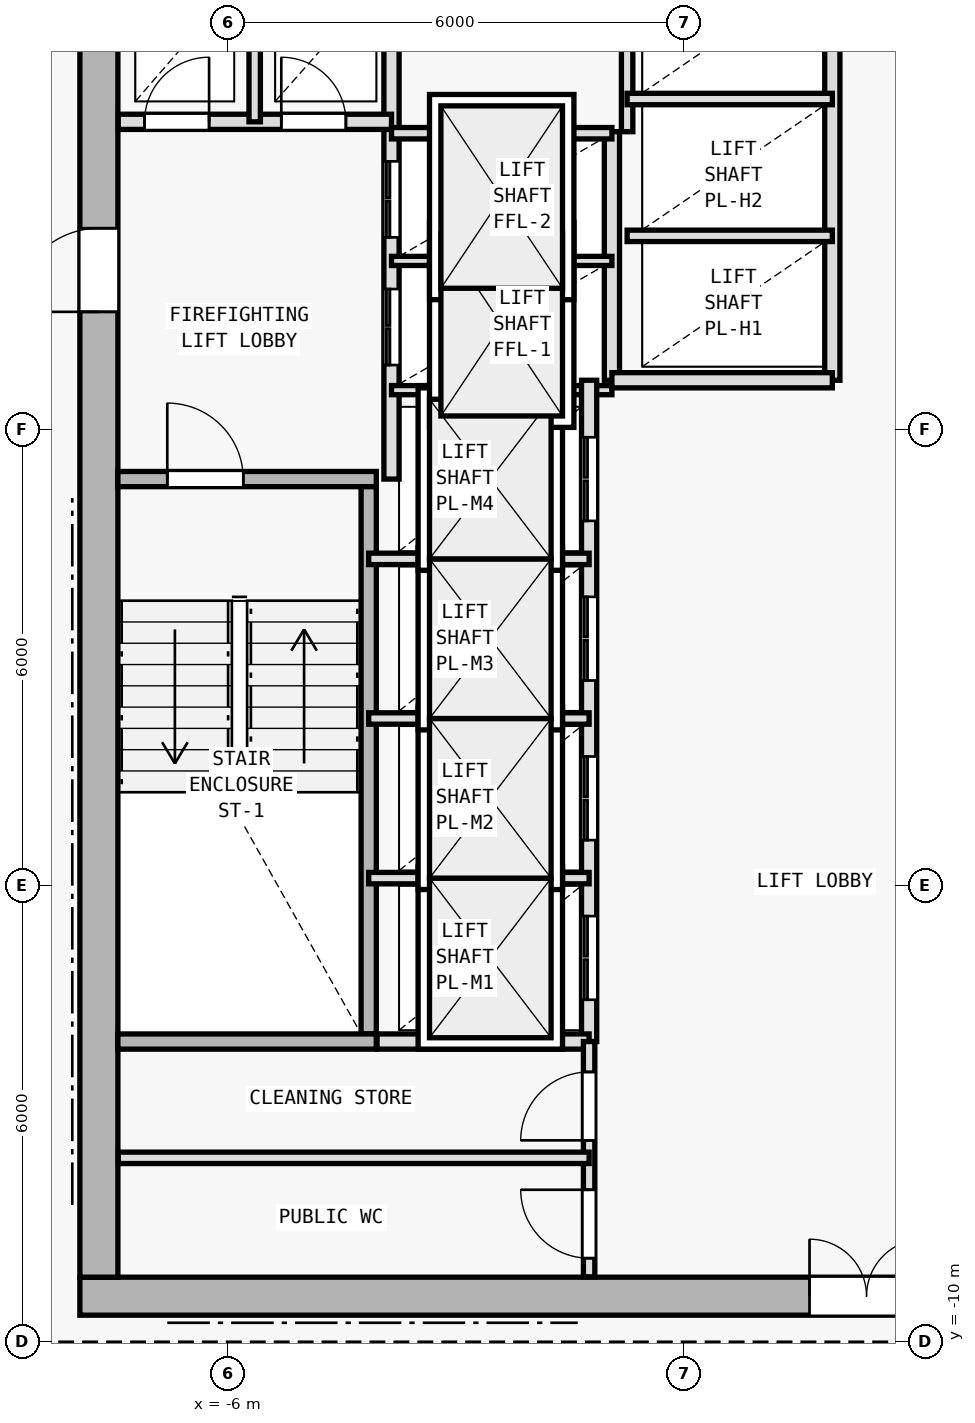
"""IFC4 building model, lengths in metres.
Left out: names, types, materials, properties, quantities, classifications, styles, units other than length and angle.
Written with IfcOpenShell. Run it as: python <this file> out.ifc"""

import sys

from ifc_helpers import new_model, si_unit, direction, frame, frame_2d, origin, origin_2d, place, context, subcontext, project, spatial, rectangle, i_section, extrude, element, fill, save


model = new_model("IFC4")
c1 = context("Model", 3, precision=1e-05, world=origin(), true_north=direction((0.0, 1.0)))
c2 = subcontext(c1, "Body", "Model", "MODEL_VIEW")
j1 = project(units=[si_unit("LENGTHUNIT", "METRE"), si_unit("PLANEANGLEUNIT", "RADIAN")], contexts=[c1])
p1 = place(None, origin())
s1 = spatial("IfcSite", under=j1, at=p1, CompositionType="ELEMENT")
p2 = place(p1, origin())
s2 = spatial("IfcBuilding", under=s1, at=p2, CompositionType="ELEMENT")
p3 = place(p2, frame((0.0, 0.0, 163.8)))
s3 = spatial("IfcBuildingStorey", under=s2, at=p3, CompositionType="ELEMENT", Elevation=163.8)
for number, where, z_axis, x_axis in (
    (1, (-7.7, -9.4, 0.0), (0.0, 0.0, 1.0), (1.0, 0.0, 0.0)),
    (2, (0.0, -9.4, 0.0), (0.0, 0.0, 1.0), (1.0, 0.0, 0.0)),
    (3, (-7.7, 2.0, 0.0), (0.0, 0.0, 1.0), (1.0, 0.0, 0.0)),
):
    element("IfcColumn", number, at=place(p3, frame(where, z_axis=z_axis, x_axis=x_axis)), inside=s3, PredefinedType="COLUMN", context=c2, shape_type="SweptSolid", body=[
        extrude(i_section(OverallWidth=0.404, OverallDepth=0.407, WebThickness=0.017, FlangeThickness=0.028, FilletRadius=0.015, at=origin_2d()), origin(), (0.0, 0.0, 1.0), 3.6),
    ])
p4 = place(p3, frame((-7.95, -9.4, 0.0), z_axis=(0.0, 0.0, 1.0), x_axis=(1.0, 0.0, 0.0)))
e4 = element("IfcWall", 4, at=p4, inside=s3, PredefinedType="SHEAR", context=c2, shape_type="SweptSolid", body=[
    extrude(rectangle(XDim=15.9, YDim=0.5, at=frame_2d((7.95, 0.0))), origin(), (0.0, 0.0, 1.0), 3.35),
])
p5 = place(p4, frame((9.6, 0.0, 0.0)))
e5 = element("IfcOpeningElement", 5, at=p5, cuts=e4, PredefinedType="OPENING", context=c2, shape_type="SweptSolid", body=[
    extrude(rectangle(XDim=1.5, YDim=2.2, at=frame_2d((0.75, 1.1))), frame((0.0, 0.26, 0.0), z_axis=(0.0, -1.0, 0.0), x_axis=(1.0, 0.0, 0.0)), (0.0, 0.0, 1.0), 0.52),
])
p6 = place(p3, frame((-7.7, -9.15, 0.0), z_axis=(0.0, 0.0, 1.0), x_axis=(0.0, 1.0, 0.0)))
e6 = element("IfcWall", 6, at=p6, inside=s3, PredefinedType="SHEAR", context=c2, shape_type="SweptSolid", body=[
    extrude(rectangle(XDim=19.1, YDim=0.5, at=frame_2d((9.55, 0.0))), origin(), (0.0, 0.0, 1.0), 3.35),
])
p7 = place(p6, frame((12.7, 0.0, 0.0)))
e7 = element("IfcOpeningElement", 7, at=p7, cuts=e6, PredefinedType="OPENING", context=c2, shape_type="SweptSolid", body=[
    extrude(rectangle(XDim=1.1, YDim=2.15, at=frame_2d((0.55, 1.075))), frame((0.0, 0.26, 0.0), z_axis=(0.0, -1.0, 0.0), x_axis=(1.0, 0.0, 0.0)), (0.0, 0.0, 1.0), 0.52),
])
p8 = place(p3, frame((-7.45, 1.35, 0.0), z_axis=(0.0, 0.0, 1.0), x_axis=(1.0, 0.0, 0.0)))
e8 = element("IfcWall", 8, at=p8, inside=s3, PredefinedType="SOLIDWALL", context=c2, shape_type="SweptSolid", body=[
    extrude(rectangle(XDim=3.4, YDim=0.2, at=frame_2d((1.7, 0.0))), origin(), (0.0, 0.0, 1.0), 3.35),
])
p9 = place(p8, frame((0.65, 0.0, 0.0)))
e9 = element("IfcOpeningElement", 9, at=p9, cuts=e8, PredefinedType="OPENING", context=c2, shape_type="SweptSolid", body=[
    extrude(rectangle(XDim=1.0, YDim=2.15, at=frame_2d((0.5, 1.075))), frame((0.0, 0.11, 0.0), z_axis=(0.0, -1.0, 0.0), x_axis=(1.0, 0.0, 0.0)), (0.0, 0.0, 1.0), 0.22),
])
p10 = place(p3, frame((-4.15, -5.95, 0.0), z_axis=(0.0, 0.0, 1.0), x_axis=(0.0, 1.0, 0.0)))
e10 = element("IfcWall", 10, at=p10, inside=s3, PredefinedType="SOLIDWALL", context=c2, shape_type="SweptSolid", body=[
    extrude(rectangle(XDim=7.2, YDim=0.2, at=frame_2d((3.6, 0.0))), origin(), (0.0, 0.0, 1.0), 3.35),
])
p11 = place(p3, frame((-3.85, 1.35, 0.0), z_axis=(0.0, 0.0, 1.0), x_axis=(0.0, 1.0, 0.0)))
e11 = element("IfcWall", 11, at=p11, inside=s3, PredefinedType="SOLIDWALL", context=c2, shape_type="SweptSolid", body=[
    extrude(rectangle(XDim=8.595, YDim=0.2, at=frame_2d((4.297, 0.0))), origin(), (0.0, 0.0, 1.0), 3.35),
])
p12 = place(p11, frame((1.5, 0.0, 0.0)))
e12 = element("IfcOpeningElement", 12, at=p12, cuts=e11, PredefinedType="OPENING", context=c2, shape_type="SweptSolid", body=[
    extrude(rectangle(XDim=1.0, YDim=2.15, at=frame_2d((0.5, 1.075))), frame((0.0, 0.11, 0.0), z_axis=(0.0, -1.0, 0.0), x_axis=(1.0, 0.0, 0.0)), (0.0, 0.0, 1.0), 0.22),
])
p13 = place(p11, frame((3.18, 0.0, 0.0)))
e13 = element("IfcOpeningElement", 13, at=p13, cuts=e11, PredefinedType="OPENING", context=c2, shape_type="SweptSolid", body=[
    extrude(rectangle(XDim=1.0, YDim=2.15, at=frame_2d((0.5, 1.075))), frame((0.0, 0.11, 0.0), z_axis=(0.0, -1.0, 0.0), x_axis=(1.0, 0.0, 0.0)), (0.0, 0.0, 1.0), 0.22),
])
p14 = place(p3, frame((-7.445, 6.05, 0.0), z_axis=(0.0, 0.0, 1.0), x_axis=(1.0, 0.0, 0.0)))
e14 = element("IfcWall", 14, at=p14, inside=s3, PredefinedType="SOLIDWALL", context=c2, shape_type="SweptSolid", body=[
    extrude(rectangle(XDim=3.595, YDim=0.2, at=frame_2d((1.797, 0.0))), origin(), (0.0, 0.0, 1.0), 3.35),
])
p15 = place(p14, frame((0.345, 0.0, 0.0)))
e15 = element("IfcOpeningElement", 15, at=p15, cuts=e14, PredefinedType="OPENING", context=c2, shape_type="SweptSolid", body=[
    extrude(rectangle(XDim=0.85, YDim=2.1, at=frame_2d((0.425, 1.05))), frame((0.0, 0.11, 0.0), z_axis=(0.0, -1.0, 0.0), x_axis=(1.0, 0.0, 0.0)), (0.0, 0.0, 1.0), 0.22),
])
p16 = place(p14, frame((2.145, 0.0, 0.0)))
e16 = element("IfcOpeningElement", 16, at=p16, cuts=e14, PredefinedType="OPENING", context=c2, shape_type="SweptSolid", body=[
    extrude(rectangle(XDim=0.85, YDim=2.1, at=frame_2d((0.425, 1.05))), frame((0.0, 0.11, 0.0), z_axis=(0.0, -1.0, 0.0), x_axis=(1.0, 0.0, 0.0)), (0.0, 0.0, 1.0), 0.22),
])
p17 = place(p3, frame((-5.65, 6.05, 0.0), z_axis=(0.0, 0.0, 1.0), x_axis=(0.0, 1.0, 0.0)))
e17 = element("IfcWall", 17, at=p17, inside=s3, PredefinedType="PARTITIONING", context=c2, shape_type="SweptSolid", body=[
    extrude(rectangle(XDim=2.05, YDim=0.15, at=frame_2d((1.025, 0.0))), origin(), (0.0, 0.0, 1.0), 3.35),
])
p18 = place(p3, frame((-0.95, 2.65, 0.0), z_axis=(0.0, 0.0, 1.0), x_axis=(0.0, 1.0, 0.0)))
e18 = element("IfcWall", 18, at=p18, inside=s3, PredefinedType="SOLIDWALL", context=c2, shape_type="SweptSolid", body=[
    extrude(rectangle(XDim=3.27, YDim=0.2, at=frame_2d((1.635, 0.0))), origin(), (0.0, 0.0, 1.0), 3.35),
])
for number, where, z_axis, x_axis in (
    (19, (-3.85, 2.52, 0.0), (0.0, 0.0, 1.0), (1.0, 0.0, 0.0)),
    (20, (-3.85, 4.22, 0.0), (0.0, 0.0, 1.0), (1.0, 0.0, 0.0)),
):
    element("IfcWall", number, at=place(p3, frame(where, z_axis=z_axis, x_axis=x_axis)), inside=s3, PredefinedType="PARTITIONING", context=c2, shape_type="SweptSolid", body=[
        extrude(rectangle(XDim=2.9, YDim=0.12, at=frame_2d((1.45, 0.0))), origin(), (0.0, 0.0, 1.0), 3.35),
    ])
p19 = place(p3, frame((-3.85, 5.9, 0.0), z_axis=(0.0, 0.0, 1.0), x_axis=(1.0, 0.0, 0.0)))
e21 = element("IfcWall", 21, at=p19, inside=s3, PredefinedType="PARTITIONING", context=c2, shape_type="SweptSolid", body=[
    extrude(rectangle(XDim=2.9, YDim=0.15, at=frame_2d((1.45, 0.0))), origin(), (0.0, 0.0, 1.0), 3.35),
])
p20 = place(p3, frame((-1.25, -6.05, 0.0), z_axis=(0.0, 0.0, 1.0), x_axis=(0.0, 1.0, 0.0)))
e22 = element("IfcWall", 22, at=p20, inside=s3, PredefinedType="SOLIDWALL", context=c2, shape_type="SweptSolid", body=[
    extrude(rectangle(XDim=8.7, YDim=0.2, at=frame_2d((4.35, 0.0))), origin(), (0.0, 0.0, 1.0), 3.35),
])
p21 = place(p20, frame((0.55, 0.0, 0.0)))
e23 = element("IfcOpeningElement", 23, at=p21, cuts=e22, PredefinedType="OPENING", context=c2, shape_type="SweptSolid", body=[
    extrude(rectangle(XDim=1.1, YDim=2.15, at=frame_2d((0.55, 1.075))), frame((0.0, 0.11, 0.0), z_axis=(0.0, -1.0, 0.0), x_axis=(1.0, 0.0, 0.0)), (0.0, 0.0, 1.0), 0.22),
])
p22 = place(p20, frame((2.65, 0.0, 0.0)))
e24 = element("IfcOpeningElement", 24, at=p22, cuts=e22, PredefinedType="OPENING", context=c2, shape_type="SweptSolid", body=[
    extrude(rectangle(XDim=1.1, YDim=2.15, at=frame_2d((0.55, 1.075))), frame((0.0, 0.11, 0.0), z_axis=(0.0, -1.0, 0.0), x_axis=(1.0, 0.0, 0.0)), (0.0, 0.0, 1.0), 0.22),
])
p23 = place(p20, frame((4.75, 0.0, 0.0)))
e25 = element("IfcOpeningElement", 25, at=p23, cuts=e22, PredefinedType="OPENING", context=c2, shape_type="SweptSolid", body=[
    extrude(rectangle(XDim=1.1, YDim=2.15, at=frame_2d((0.55, 1.075))), frame((0.0, 0.11, 0.0), z_axis=(0.0, -1.0, 0.0), x_axis=(1.0, 0.0, 0.0)), (0.0, 0.0, 1.0), 0.22),
])
p24 = place(p20, frame((6.85, 0.0, 0.0)))
e26 = element("IfcOpeningElement", 26, at=p24, cuts=e22, PredefinedType="OPENING", context=c2, shape_type="SweptSolid", body=[
    extrude(rectangle(XDim=1.1, YDim=2.15, at=frame_2d((0.55, 1.075))), frame((0.0, 0.11, 0.0), z_axis=(0.0, -1.0, 0.0), x_axis=(1.0, 0.0, 0.0)), (0.0, 0.0, 1.0), 0.22),
])
for number, where, z_axis, x_axis in (
    (27, (-4.15, -3.9, 0.0), (0.0, 0.0, 1.0), (1.0, 0.0, 0.0)),
    (28, (-4.15, -1.8, 0.0), (0.0, 0.0, 1.0), (1.0, 0.0, 0.0)),
    (29, (-4.15, 0.3, 0.0), (0.0, 0.0, 1.0), (1.0, 0.0, 0.0)),
):
    element("IfcWall", number, at=place(p3, frame(where, z_axis=z_axis, x_axis=x_axis)), inside=s3, PredefinedType="PARTITIONING", context=c2, shape_type="SweptSolid", body=[
        extrude(rectangle(XDim=2.9, YDim=0.15, at=frame_2d((1.45, 0.0))), origin(), (0.0, 0.0, 1.0), 3.35),
    ])
p25 = place(p3, frame((1.95, 2.65, 0.0), z_axis=(0.0, 0.0, 1.0), x_axis=(0.0, 1.0, 0.0)))
e30 = element("IfcWall", 30, at=p25, inside=s3, PredefinedType="SOLIDWALL", context=c2, shape_type="SweptSolid", body=[
    extrude(rectangle(XDim=7.295, YDim=0.2, at=frame_2d((3.647, 0.0))), origin(), (0.0, 0.0, 1.0), 3.35),
])
p26 = place(p3, frame((-0.95, 2.65, 0.0), z_axis=(0.0, 0.0, 1.0), x_axis=(1.0, 0.0, 0.0)))
e31 = element("IfcWall", 31, at=p26, inside=s3, PredefinedType="SOLIDWALL", context=c2, shape_type="SweptSolid", body=[
    extrude(rectangle(XDim=2.9, YDim=0.2, at=frame_2d((1.45, 0.0))), origin(), (0.0, 0.0, 1.0), 3.35),
])
p27 = place(p3, frame((-0.75, 5.92, 0.0), z_axis=(0.0, 0.0, 1.0), x_axis=(0.0, 1.0, 0.0)))
e32 = element("IfcWall", 32, at=p27, inside=s3, PredefinedType="PARTITIONING", context=c2, shape_type="SweptSolid", body=[
    extrude(rectangle(XDim=4.025, YDim=0.15, at=frame_2d((2.013, 0.0))), origin(), (0.0, 0.0, 1.0), 3.35),
])
for number, where, z_axis, x_axis in (
    (33, (-0.75, 4.55, 0.0), (0.0, 0.0, 1.0), (1.0, 0.0, 0.0)),
    (34, (-0.75, 6.35, 0.0), (0.0, 0.0, 1.0), (1.0, 0.0, 0.0)),
):
    element("IfcWall", number, at=place(p3, frame(where, z_axis=z_axis, x_axis=x_axis)), inside=s3, PredefinedType="PARTITIONING", context=c2, shape_type="SweptSolid", body=[
        extrude(rectangle(XDim=2.7, YDim=0.15, at=frame_2d((1.35, 0.0))), origin(), (0.0, 0.0, 1.0), 3.35),
    ])
p28 = place(p3, frame((-7.45, -6.05, 0.0), z_axis=(0.0, 0.0, 1.0), x_axis=(1.0, 0.0, 0.0)))
e35 = element("IfcWall", 35, at=p28, inside=s3, PredefinedType="SOLIDWALL", context=c2, shape_type="SweptSolid", body=[
    extrude(rectangle(XDim=3.4, YDim=0.2, at=frame_2d((1.7, 0.0))), origin(), (0.0, 0.0, 1.0), 3.35),
])
p29 = place(p3, frame((-4.04, -6.05, 0.0), z_axis=(0.0, 0.0, 1.0), x_axis=(1.0, 0.0, 0.0)))
e36 = element("IfcWall", 36, at=p29, inside=s3, PredefinedType="SOLIDWALL", context=c2, shape_type="SweptSolid", body=[
    extrude(rectangle(XDim=2.79, YDim=0.2, at=frame_2d((1.395, 0.0))), origin(), (0.0, 0.0, 1.0), 3.35),
])
p30 = place(p3, frame((-1.25, -9.145, 0.0), z_axis=(0.0, 0.0, 1.0), x_axis=(0.0, 1.0, 0.0)))
e37 = element("IfcWall", 37, at=p30, inside=s3, PredefinedType="PARTITIONING", context=c2, shape_type="SweptSolid", body=[
    extrude(rectangle(XDim=3.095, YDim=0.15, at=frame_2d((1.547, 0.0))), origin(), (0.0, 0.0, 1.0), 3.35),
])
p31 = place(p30, frame((1.795, 0.0, 0.0)))
e38 = element("IfcOpeningElement", 38, at=p31, cuts=e37, PredefinedType="OPENING", context=c2, shape_type="SweptSolid", body=[
    extrude(rectangle(XDim=0.9, YDim=2.1, at=frame_2d((0.45, 1.05))), frame((0.0, 0.085, 0.0), z_axis=(0.0, -1.0, 0.0), x_axis=(1.0, 0.0, 0.0)), (0.0, 0.0, 1.0), 0.17),
])
p32 = place(p30, frame((0.245, 0.0, 0.0)))
e39 = element("IfcOpeningElement", 39, at=p32, cuts=e37, PredefinedType="OPENING", context=c2, shape_type="SweptSolid", body=[
    extrude(rectangle(XDim=0.9, YDim=2.1, at=frame_2d((0.45, 1.05))), frame((0.0, 0.085, 0.0), z_axis=(0.0, -1.0, 0.0), x_axis=(1.0, 0.0, 0.0)), (0.0, 0.0, 1.0), 0.17),
])
p33 = place(p3, frame((-7.445, -7.58, 0.0), z_axis=(0.0, 0.0, 1.0), x_axis=(1.0, 0.0, 0.0)))
e40 = element("IfcWall", 40, at=p33, inside=s3, PredefinedType="PARTITIONING", context=c2, shape_type="SweptSolid", body=[
    extrude(rectangle(XDim=6.195, YDim=0.15, at=frame_2d((3.098, 0.0))), origin(), (0.0, 0.0, 1.0), 3.35),
])
p34 = place(p5, origin())
e41 = element("IfcDoor", 41, at=p34, inside=s3, OperationType="DOUBLE_DOOR_SINGLE_SWING", PredefinedType="DOOR", context=c2, shape_type="SweptSolid", body=[
    extrude(rectangle(XDim=1.5, YDim=2.2, at=frame_2d((0.75, 1.1))), frame((0.0, 0.025, 0.0), z_axis=(0.0, -1.0, 0.0), x_axis=(1.0, 0.0, 0.0)), (0.0, 0.0, 1.0), 0.05),
])
fill(e5, e41)
p35 = place(p7, origin())
e42 = element("IfcDoor", 42, at=p35, inside=s3, OperationType="SINGLE_SWING_LEFT", PredefinedType="DOOR", context=c2, shape_type="SweptSolid", body=[
    extrude(rectangle(XDim=1.1, YDim=2.15, at=frame_2d((0.55, 1.075))), frame((0.0, 0.025, 0.0), z_axis=(0.0, -1.0, 0.0), x_axis=(1.0, 0.0, 0.0)), (0.0, 0.0, 1.0), 0.05),
])
fill(e7, e42)
p36 = place(p9, origin())
e43 = element("IfcDoor", 43, at=p36, inside=s3, OperationType="SINGLE_SWING_LEFT", PredefinedType="DOOR", context=c2, shape_type="SweptSolid", body=[
    extrude(rectangle(XDim=1.0, YDim=2.15, at=frame_2d((0.5, 1.075))), frame((0.0, 0.025, 0.0), z_axis=(0.0, -1.0, 0.0), x_axis=(1.0, 0.0, 0.0)), (0.0, 0.0, 1.0), 0.05),
])
fill(e9, e43)
p37 = place(p15, origin())
e44 = element("IfcDoor", 44, at=p37, inside=s3, OperationType="SINGLE_SWING_RIGHT", PredefinedType="DOOR", context=c2, shape_type="SweptSolid", body=[
    extrude(rectangle(XDim=0.85, YDim=2.1, at=frame_2d((0.425, 1.05))), frame((0.0, 0.025, 0.0), z_axis=(0.0, -1.0, 0.0), x_axis=(1.0, 0.0, 0.0)), (0.0, 0.0, 1.0), 0.05),
])
fill(e15, e44)
p38 = place(p16, origin())
e45 = element("IfcDoor", 45, at=p38, inside=s3, OperationType="SINGLE_SWING_LEFT", PredefinedType="DOOR", context=c2, shape_type="SweptSolid", body=[
    extrude(rectangle(XDim=0.85, YDim=2.1, at=frame_2d((0.425, 1.05))), frame((0.0, 0.025, 0.0), z_axis=(0.0, -1.0, 0.0), x_axis=(1.0, 0.0, 0.0)), (0.0, 0.0, 1.0), 0.05),
])
fill(e16, e45)
p39 = place(p21, origin())
e46 = element("IfcDoor", 46, at=p39, inside=s3, OperationType="DOUBLE_DOOR_SLIDING", PredefinedType="DOOR", context=c2, shape_type="SweptSolid", body=[
    extrude(rectangle(XDim=1.1, YDim=2.15, at=frame_2d((0.55, 1.075))), frame((0.0, 0.025, 0.0), z_axis=(0.0, -1.0, 0.0), x_axis=(1.0, 0.0, 0.0)), (0.0, 0.0, 1.0), 0.05),
])
fill(e23, e46)
p40 = place(p22, origin())
e47 = element("IfcDoor", 47, at=p40, inside=s3, OperationType="DOUBLE_DOOR_SLIDING", PredefinedType="DOOR", context=c2, shape_type="SweptSolid", body=[
    extrude(rectangle(XDim=1.1, YDim=2.15, at=frame_2d((0.55, 1.075))), frame((0.0, 0.025, 0.0), z_axis=(0.0, -1.0, 0.0), x_axis=(1.0, 0.0, 0.0)), (0.0, 0.0, 1.0), 0.05),
])
fill(e24, e47)
p41 = place(p23, origin())
e48 = element("IfcDoor", 48, at=p41, inside=s3, OperationType="DOUBLE_DOOR_SLIDING", PredefinedType="DOOR", context=c2, shape_type="SweptSolid", body=[
    extrude(rectangle(XDim=1.1, YDim=2.15, at=frame_2d((0.55, 1.075))), frame((0.0, 0.025, 0.0), z_axis=(0.0, -1.0, 0.0), x_axis=(1.0, 0.0, 0.0)), (0.0, 0.0, 1.0), 0.05),
])
fill(e25, e48)
p42 = place(p24, origin())
e49 = element("IfcDoor", 49, at=p42, inside=s3, OperationType="DOUBLE_DOOR_SLIDING", PredefinedType="DOOR", context=c2, shape_type="SweptSolid", body=[
    extrude(rectangle(XDim=1.1, YDim=2.15, at=frame_2d((0.55, 1.075))), frame((0.0, 0.025, 0.0), z_axis=(0.0, -1.0, 0.0), x_axis=(1.0, 0.0, 0.0)), (0.0, 0.0, 1.0), 0.05),
])
fill(e26, e49)
p43 = place(p12, origin())
e50 = element("IfcDoor", 50, at=p43, inside=s3, OperationType="DOUBLE_DOOR_SLIDING", PredefinedType="DOOR", context=c2, shape_type="SweptSolid", body=[
    extrude(rectangle(XDim=1.0, YDim=2.15, at=frame_2d((0.5, 1.075))), frame((0.0, 0.025, 0.0), z_axis=(0.0, -1.0, 0.0), x_axis=(1.0, 0.0, 0.0)), (0.0, 0.0, 1.0), 0.05),
])
fill(e12, e50)
p44 = place(p13, origin())
e51 = element("IfcDoor", 51, at=p44, inside=s3, OperationType="DOUBLE_DOOR_SLIDING", PredefinedType="DOOR", context=c2, shape_type="SweptSolid", body=[
    extrude(rectangle(XDim=1.0, YDim=2.15, at=frame_2d((0.5, 1.075))), frame((0.0, 0.025, 0.0), z_axis=(0.0, -1.0, 0.0), x_axis=(1.0, 0.0, 0.0)), (0.0, 0.0, 1.0), 0.05),
])
fill(e13, e51)
p45 = place(p31, origin())
e52 = element("IfcDoor", 52, at=p45, inside=s3, OperationType="SINGLE_SWING_LEFT", PredefinedType="DOOR", context=c2, shape_type="SweptSolid", body=[
    extrude(rectangle(XDim=0.9, YDim=2.1, at=frame_2d((0.45, 1.05))), frame((0.0, 0.025, 0.0), z_axis=(0.0, -1.0, 0.0), x_axis=(1.0, 0.0, 0.0)), (0.0, 0.0, 1.0), 0.05),
])
fill(e38, e52)
p46 = place(p32, origin())
e53 = element("IfcDoor", 53, at=p46, inside=s3, OperationType="SINGLE_SWING_RIGHT", PredefinedType="DOOR", context=c2, shape_type="SweptSolid", body=[
    extrude(rectangle(XDim=0.9, YDim=2.1, at=frame_2d((0.45, 1.05))), frame((0.0, 0.025, 0.0), z_axis=(0.0, -1.0, 0.0), x_axis=(1.0, 0.0, 0.0)), (0.0, 0.0, 1.0), 0.05),
])
fill(e39, e53)
save(model, sys.argv[1])
